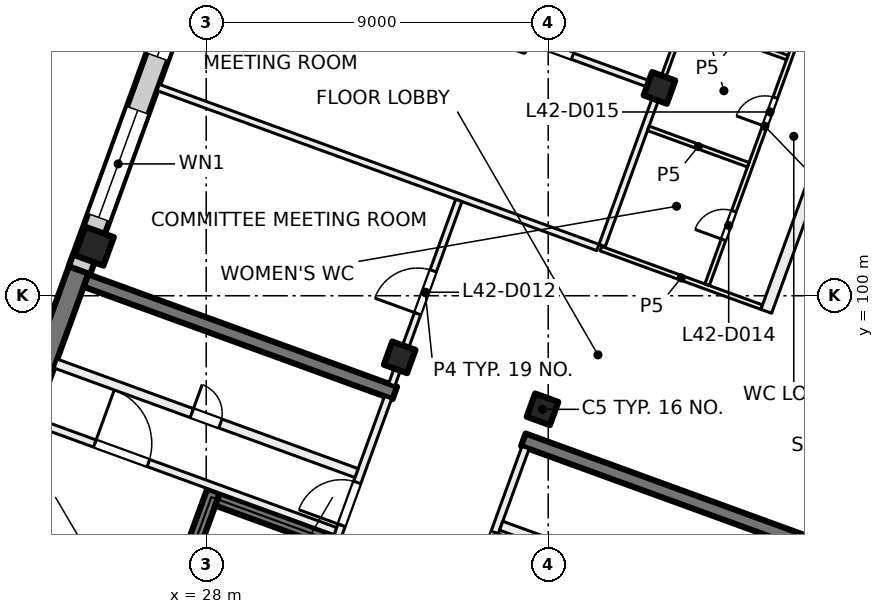
"""IFC4 building model, lengths in metres.
Left out: names, types, materials, properties, quantities, classifications, styles, units other than length and angle.
Written with IfcOpenShell. Run it as: python <this file> out.ifc"""

import sys

from ifc_helpers import new_model, si_unit, direction, frame, frame_2d, origin, origin_2d, place, context, subcontext, project, spatial, rectangle, extrude, element, fill, save


model = new_model("IFC4")
c1 = context("Model", 3, precision=1e-05, world=origin(), true_north=direction((0.0, 1.0)))
c2 = subcontext(c1, "Body", "Model", "MODEL_VIEW")
j1 = project(units=[si_unit("LENGTHUNIT", "METRE"), si_unit("PLANEANGLEUNIT", "RADIAN")], contexts=[c1])
p1 = place(None, origin())
s1 = spatial("IfcSite", under=j1, at=p1, CompositionType="ELEMENT")
p2 = place(p1, origin())
s2 = spatial("IfcBuilding", under=s1, at=p2, CompositionType="ELEMENT")
p3 = place(p2, frame((0.0, 0.0, 178.5)))
s3 = spatial("IfcBuildingStorey", under=s2, at=p3, CompositionType="ELEMENT", Elevation=178.5)
for number, where, z_axis, x_axis in (
    (1, (39.927, 105.468, 0.0), (0.0, 0.0, 1.0), (-0.342, -0.94, 0.0)),
    (2, (36.849, 97.011, 0.0), (0.0, 0.0, 1.0), (-0.342, -0.94, 0.0)),
    (3, (33.091, 98.379, 0.0), (0.0, 0.0, 1.0), (-0.342, -0.94, 0.0)),
):
    element("IfcColumn", number, at=place(p3, frame(where, z_axis=z_axis, x_axis=x_axis)), inside=s3, PredefinedType="COLUMN", context=c2, shape_type="SweptSolid", body=[
        extrude(rectangle(XDim=0.65, YDim=0.65, at=origin_2d()), origin(), (0.0, 0.0, 1.0), 4.0),
    ])
p4 = place(p3, frame((25.056, 101.303, 0.0), z_axis=(0.0, 0.0, 1.0), x_axis=(-0.342020143326, -0.939692620786, 0.0)))
e4 = element("IfcColumn", 4, at=p4, inside=s3, PredefinedType="COLUMN", context=c2, shape_type="SweptSolid", body=[
    extrude(rectangle(XDim=0.8, YDim=0.8, at=origin_2d()), origin(), (0.0, 0.0, 1.0), 4.0),
])
p5 = place(p3, frame((41.85, 85.241, 0.0), z_axis=(0.0, 0.0, 1.0), x_axis=(0.34201902012, 0.939693029598, 0.0)))
e5 = element("IfcWall", 5, at=p5, inside=s3, PredefinedType="SHEAR", context=c2, shape_type="SweptSolid", body=[
    extrude(rectangle(XDim=8.95, YDim=0.55, at=frame_2d((4.475, 0.0))), origin(), (0.0, 0.0, 1.0), 4.0),
])
p6 = place(p3, frame((21.694, 92.577, 0.0), z_axis=(0.0, 0.0, 1.0), x_axis=(0.342010253184, 0.939696220444, 0.0)))
e6 = element("IfcWall", 6, at=p6, inside=s3, PredefinedType="SHEAR", context=c2, shape_type="SweptSolid", body=[
    extrude(rectangle(XDim=8.95, YDim=0.55, at=frame_2d((4.475, 0.0))), origin(), (0.0, 0.0, 1.0), 4.0),
])
p7 = place(p3, frame((27.208, 82.216, 0.0), z_axis=(0.0, 0.0, 1.0), x_axis=(0.34201563943, 0.939694260058, 0.0)))
e7 = element("IfcWall", 7, at=p7, inside=s3, PredefinedType="SHEAR", context=c2, shape_type="SweptSolid", body=[
    extrude(rectangle(XDim=12.225, YDim=0.35, at=frame_2d((6.113, 0.0))), origin(), (0.0, 0.0, 1.0), 4.0),
])
p8 = place(p7, frame((0.7, 0.0, 0.0)))
e8 = element("IfcOpeningElement", 8, at=p8, cuts=e7, PredefinedType="OPENING", context=c2, shape_type="SweptSolid", body=[
    extrude(rectangle(XDim=1.1, YDim=2.1, at=frame_2d((0.55, 1.05))), frame((0.0, 0.185, 0.0), z_axis=(0.0, -1.0, 0.0), x_axis=(1.0, 0.0, 0.0)), (0.0, 0.0, 1.0), 0.37),
])
p9 = place(p7, frame((3.1, 0.0, 0.0)))
e9 = element("IfcOpeningElement", 9, at=p9, cuts=e7, PredefinedType="OPENING", context=c2, shape_type="SweptSolid", body=[
    extrude(rectangle(XDim=1.1, YDim=2.1, at=frame_2d((0.55, 1.05))), frame((0.0, 0.185, 0.0), z_axis=(0.0, -1.0, 0.0), x_axis=(1.0, 0.0, 0.0)), (0.0, 0.0, 1.0), 0.37),
])
p10 = place(p7, frame((5.5, 0.0, 0.0)))
e10 = element("IfcOpeningElement", 10, at=p10, cuts=e7, PredefinedType="OPENING", context=c2, shape_type="SweptSolid", body=[
    extrude(rectangle(XDim=1.1, YDim=2.1, at=frame_2d((0.55, 1.05))), frame((0.0, 0.185, 0.0), z_axis=(0.0, -1.0, 0.0), x_axis=(1.0, 0.0, 0.0)), (0.0, 0.0, 1.0), 0.37),
])
p11 = place(p7, frame((10.3, 0.0, 0.0)))
e11 = element("IfcOpeningElement", 11, at=p11, cuts=e7, PredefinedType="OPENING", context=c2, shape_type="SweptSolid", body=[
    extrude(rectangle(XDim=1.1, YDim=2.1, at=frame_2d((0.55, 1.05))), frame((0.0, 0.185, 0.0), z_axis=(0.0, -1.0, 0.0), x_axis=(1.0, 0.0, 0.0)), (0.0, 0.0, 1.0), 0.37),
])
p12 = place(p3, frame((24.013, 83.379, 0.0), z_axis=(0.0, 0.0, 1.0), x_axis=(0.34201563943, 0.939694260058, 0.0)))
e12 = element("IfcWall", 12, at=p12, inside=s3, PredefinedType="SHEAR", context=c2, shape_type="SweptSolid", body=[
    extrude(rectangle(XDim=12.225, YDim=0.35, at=frame_2d((6.113, 0.0))), origin(), (0.0, 0.0, 1.0), 4.0),
])
p13 = place(p12, frame((7.95, 0.0, 0.0)))
e13 = element("IfcOpeningElement", 13, at=p13, cuts=e12, PredefinedType="OPENING", context=c2, shape_type="SweptSolid", body=[
    extrude(rectangle(XDim=1.1, YDim=2.1, at=frame_2d((0.55, 1.05))), frame((0.0, 0.185, 0.0), z_axis=(0.0, -1.0, 0.0), x_axis=(1.0, 0.0, 0.0)), (0.0, 0.0, 1.0), 0.37),
])
p14 = place(p3, frame((31.165, 93.599, 0.0), z_axis=(0.0, 0.0, 1.0), x_axis=(-0.939683528043, 0.3420451244, 0.0)))
e14 = element("IfcWall", 14, at=p14, inside=s3, PredefinedType="SHEAR", context=c2, shape_type="SweptSolid", body=[
    extrude(rectangle(XDim=3.05, YDim=0.35, at=frame_2d((1.525, 0.0))), origin(), (0.0, 0.0, 1.0), 4.0),
])
p15 = place(p3, frame((44.473, 93.251, 0.0), z_axis=(0.0, 0.0, 1.0), x_axis=(-0.939692847377, 0.34201952077, 0.0)))
e15 = element("IfcWall", 15, at=p15, inside=s3, PredefinedType="SHEAR", context=c2, shape_type="SweptSolid", body=[
    extrude(rectangle(XDim=8.65, YDim=0.35, at=frame_2d((4.325, 0.0))), origin(), (0.0, 0.0, 1.0), 4.0),
])
p16 = place(p3, frame((32.962, 97.441, 0.0), z_axis=(0.0, 0.0, 1.0), x_axis=(-0.939689545667, 0.342028592028, 0.0)))
e16 = element("IfcWall", 16, at=p16, inside=s3, PredefinedType="SHEAR", context=c2, shape_type="SweptSolid", body=[
    extrude(rectangle(XDim=8.65, YDim=0.35, at=frame_2d((4.325, 0.0))), origin(), (0.0, 0.0, 1.0), 4.0),
])
p17 = place(p3, frame((24.666, 100.669, 0.0), z_axis=(0.0, 0.0, 1.0), x_axis=(0.34201964167, 0.939692803373, 0.0)))
e17 = element("IfcWall", 17, at=p17, inside=s3, PredefinedType="SOLIDWALL", context=c2, shape_type="SweptSolid", body=[
    extrude(rectangle(XDim=32.884, YDim=0.6, at=frame_2d((16.442, 0.0))), origin(), (0.0, 0.0, 1.0), 3.625),
])
p18 = place(p17, frame((1.48, 0.0, 0.9)))
e18 = element("IfcOpeningElement", 18, at=p18, cuts=e17, PredefinedType="OPENING", context=c2, shape_type="SweptSolid", body=[
    extrude(rectangle(XDim=3.0, YDim=2.4, at=frame_2d((1.5, 1.2))), frame((0.0, 0.31, 0.0), z_axis=(0.0, -1.0, 0.0), x_axis=(1.0, 0.0, 0.0)), (0.0, 0.0, 1.0), 0.62),
])
p19 = place(p17, frame((5.98, 0.0, 0.9)))
e19 = element("IfcOpeningElement", 19, at=p19, cuts=e17, PredefinedType="OPENING", context=c2, shape_type="SweptSolid", body=[
    extrude(rectangle(XDim=3.0, YDim=2.4, at=frame_2d((1.5, 1.2))), frame((0.0, 0.31, 0.0), z_axis=(0.0, -1.0, 0.0), x_axis=(1.0, 0.0, 0.0)), (0.0, 0.0, 1.0), 0.62),
])
p20 = place(p17, frame((11.08, 0.0, 0.0)))
e20 = element("IfcOpeningElement", 20, at=p20, cuts=e17, PredefinedType="OPENING", context=c2, shape_type="SweptSolid", body=[
    extrude(rectangle(XDim=1.8, YDim=2.4, at=frame_2d((0.9, 1.2))), frame((0.0, 0.31, 0.0), z_axis=(0.0, -1.0, 0.0), x_axis=(1.0, 0.0, 0.0)), (0.0, 0.0, 1.0), 0.62),
])
p21 = place(p17, frame((14.98, 0.0, 0.9)))
e21 = element("IfcOpeningElement", 21, at=p21, cuts=e17, PredefinedType="OPENING", context=c2, shape_type="SweptSolid", body=[
    extrude(rectangle(XDim=3.0, YDim=2.4, at=frame_2d((1.5, 1.2))), frame((0.0, 0.31, 0.0), z_axis=(0.0, -1.0, 0.0), x_axis=(1.0, 0.0, 0.0)), (0.0, 0.0, 1.0), 0.62),
])
p22 = place(p17, frame((19.48, 0.0, 0.9)))
e22 = element("IfcOpeningElement", 22, at=p22, cuts=e17, PredefinedType="OPENING", context=c2, shape_type="SweptSolid", body=[
    extrude(rectangle(XDim=3.0, YDim=2.4, at=frame_2d((1.5, 1.2))), frame((0.0, 0.31, 0.0), z_axis=(0.0, -1.0, 0.0), x_axis=(1.0, 0.0, 0.0)), (0.0, 0.0, 1.0), 0.62),
])
p23 = place(p17, frame((24.58, 0.0, 0.0)))
e23 = element("IfcOpeningElement", 23, at=p23, cuts=e17, PredefinedType="OPENING", context=c2, shape_type="SweptSolid", body=[
    extrude(rectangle(XDim=1.8, YDim=2.4, at=frame_2d((0.9, 1.2))), frame((0.0, 0.31, 0.0), z_axis=(0.0, -1.0, 0.0), x_axis=(1.0, 0.0, 0.0)), (0.0, 0.0, 1.0), 0.62),
])
p24 = place(p17, frame((28.48, 0.0, 0.9)))
e24 = element("IfcOpeningElement", 24, at=p24, cuts=e17, PredefinedType="OPENING", context=c2, shape_type="SweptSolid", body=[
    extrude(rectangle(XDim=3.0, YDim=2.4, at=frame_2d((1.5, 1.2))), frame((0.0, 0.31, 0.0), z_axis=(0.0, -1.0, 0.0), x_axis=(1.0, 0.0, 0.0)), (0.0, 0.0, 1.0), 0.62),
])
p25 = place(p3, frame((31.459, 93.678, 0.0), z_axis=(0.0, 0.0, 1.0), x_axis=(0.341985870128, 0.939705094502, 0.0)))
e25 = element("IfcWall", 25, at=p25, inside=s3, PredefinedType="PARTITIONING", context=c2, shape_type="SweptSolid", body=[
    extrude(rectangle(XDim=3.875, YDim=0.2, at=frame_2d((1.938, 0.0))), origin(), (0.0, 0.0, 1.0), 3.625),
])
p26 = place(p25, frame((0.3, 0.0, 0.0)))
e26 = element("IfcOpeningElement", 26, at=p26, cuts=e25, PredefinedType="OPENING", context=c2, shape_type="SweptSolid", body=[
    extrude(rectangle(XDim=1.2, YDim=2.1, at=frame_2d((0.6, 1.05))), frame((0.0, 0.11, 0.0), z_axis=(0.0, -1.0, 0.0), x_axis=(1.0, 0.0, 0.0)), (0.0, 0.0, 1.0), 0.22),
])
p27 = place(p3, frame((23.483, 96.688, 0.0), z_axis=(0.0, 0.0, 1.0), x_axis=(0.939691007314, -0.342024576271, 0.0)))
e27 = element("IfcWall", 27, at=p27, inside=s3, PredefinedType="PARTITIONING", context=c2, shape_type="SweptSolid", body=[
    extrude(rectangle(XDim=8.425, YDim=0.2, at=frame_2d((4.212, 0.0))), origin(), (0.0, 0.0, 1.0), 3.625),
])
p28 = place(p27, frame((1.688, 0.0, 0.0)))
e28 = element("IfcOpeningElement", 28, at=p28, cuts=e27, PredefinedType="OPENING", context=c2, shape_type="SweptSolid", body=[
    extrude(rectangle(XDim=1.5, YDim=2.1, at=frame_2d((0.75, 1.05))), frame((0.0, 0.11, 0.0), z_axis=(0.0, -1.0, 0.0), x_axis=(1.0, 0.0, 0.0)), (0.0, 0.0, 1.0), 0.22),
])
p29 = place(p3, frame((24.039, 98.215, 0.0), z_axis=(0.0, 0.0, 1.0), x_axis=(0.939687617333, -0.342033889887, 0.0)))
e29 = element("IfcWall", 29, at=p29, inside=s3, PredefinedType="PARTITIONING", context=c2, shape_type="SweptSolid", body=[
    extrude(rectangle(XDim=8.425, YDim=0.25, at=frame_2d((4.212, 0.0))), origin(), (0.0, 0.0, 1.0), 3.625),
])
p30 = place(p29, frame((3.812, 0.0, 0.0)))
e30 = element("IfcOpeningElement", 30, at=p30, cuts=e29, PredefinedType="OPENING", context=c2, shape_type="SweptSolid", body=[
    extrude(rectangle(XDim=0.8, YDim=2.1, at=frame_2d((0.4, 1.05))), frame((0.0, 0.135, 0.0), z_axis=(0.0, -1.0, 0.0), x_axis=(1.0, 0.0, 0.0)), (0.0, 0.0, 1.0), 0.27),
])
p31 = place(p3, frame((36.403, 96.003, 0.0), z_axis=(0.0, 0.0, 1.0), x_axis=(-0.342041503764, -0.939684845947, 0.0)))
e31 = element("IfcWall", 31, at=p31, inside=s3, PredefinedType="PARTITIONING", context=c2, shape_type="SweptSolid", body=[
    extrude(rectangle(XDim=3.875, YDim=0.2, at=frame_2d((1.938, 0.0))), origin(), (0.0, 0.0, 1.0), 3.625),
])
p32 = place(p31, frame((2.375, 0.0, 0.0)))
e32 = element("IfcOpeningElement", 32, at=p32, cuts=e31, PredefinedType="OPENING", context=c2, shape_type="SweptSolid", body=[
    extrude(rectangle(XDim=1.2, YDim=2.1, at=frame_2d((0.6, 1.05))), frame((0.0, 0.11, 0.0), z_axis=(0.0, -1.0, 0.0), x_axis=(1.0, 0.0, 0.0)), (0.0, 0.0, 1.0), 0.22),
])
p33 = place(p3, frame((35.761, 93.948, 0.0), z_axis=(0.0, 0.0, 1.0), x_axis=(0.93969693093, -0.342008301071, 0.0)))
e33 = element("IfcWall", 33, at=p33, inside=s3, PredefinedType="PARTITIONING", context=c2, shape_type="SweptSolid", body=[
    extrude(rectangle(XDim=8.425, YDim=0.25, at=frame_2d((4.212, 0.0))), origin(), (0.0, 0.0, 1.0), 3.625),
])
p34 = place(p33, frame((3.812, 0.0, 0.0)))
e34 = element("IfcOpeningElement", 34, at=p34, cuts=e33, PredefinedType="OPENING", context=c2, shape_type="SweptSolid", body=[
    extrude(rectangle(XDim=0.8, YDim=2.1, at=frame_2d((0.4, 1.05))), frame((0.0, 0.135, 0.0), z_axis=(0.0, -1.0, 0.0), x_axis=(1.0, 0.0, 0.0)), (0.0, 0.0, 1.0), 0.27),
])
p35 = place(p3, frame((26.736, 105.48, 0.0), z_axis=(0.0, 0.0, 1.0), x_axis=(0.939721611154, -0.341940482438, 0.0)))
e35 = element("IfcWall", 35, at=p35, inside=s3, PredefinedType="PARTITIONING", context=c2, shape_type="SweptSolid", body=[
    extrude(rectangle(XDim=12.312, YDim=0.175, at=frame_2d((6.156, 0.0))), origin(), (0.0, 0.0, 1.0), 3.625),
])
p36 = place(p3, frame((32.881, 97.657, 0.0), z_axis=(0.0, 0.0, 1.0), x_axis=(0.342058204353, 0.939678766832, 0.0)))
e36 = element("IfcWall", 36, at=p36, inside=s3, PredefinedType="PARTITIONING", context=c2, shape_type="SweptSolid", body=[
    extrude(rectangle(XDim=5.163, YDim=0.175, at=frame_2d((2.581, 0.0))), origin(), (0.0, 0.0, 1.0), 3.625),
])
p37 = place(p36, frame((1.991, 0.0, 0.0)))
e37 = element("IfcOpeningElement", 37, at=p37, cuts=e36, PredefinedType="OPENING", context=c2, shape_type="SweptSolid", body=[
    extrude(rectangle(XDim=1.2, YDim=2.1, at=frame_2d((0.6, 1.05))), frame((0.0, 0.097, 0.0), z_axis=(0.0, -1.0, 0.0), x_axis=(1.0, 0.0, 0.0)), (0.0, 0.0, 1.0), 0.195),
])
p38 = place(p3, frame((38.385, 101.24, 0.0), z_axis=(0.0, 0.0, 1.0), x_axis=(0.939711088937, -0.341969398235, 0.0)))
e38 = element("IfcWall", 38, at=p38, inside=s3, PredefinedType="PARTITIONING", context=c2, shape_type="SweptSolid", body=[
    extrude(rectangle(XDim=4.503, YDim=0.125, at=frame_2d((2.252, 0.0))), origin(), (0.0, 0.0, 1.0), 3.625),
])
p39 = place(p3, frame((38.418, 101.322, 0.0), z_axis=(0.0, 0.0, 1.0), x_axis=(0.341987815327, 0.939704386585, 0.0)))
e39 = element("IfcWall", 39, at=p39, inside=s3, PredefinedType="PARTITIONING", context=c2, shape_type="SweptSolid", body=[
    extrude(rectangle(XDim=4.325, YDim=0.175, at=frame_2d((2.162, 0.0))), origin(), (0.0, 0.0, 1.0), 3.625),
])
p40 = place(p3, frame((39.926, 105.465, 0.0), z_axis=(0.0, 0.0, 1.0), x_axis=(0.342263852659, 0.93960388205, 0.0)))
e40 = element("IfcWall", 40, at=p40, inside=s3, PredefinedType="PARTITIONING", context=c2, shape_type="SweptSolid", body=[
    extrude(rectangle(XDim=4.441, YDim=0.125, at=frame_2d((2.221, 0.0))), origin(), (0.0, 0.0, 1.0), 3.625),
])
p41 = place(p3, frame((28.275, 109.709, 0.0), z_axis=(0.0, 0.0, 1.0), x_axis=(0.939698441386, -0.342004150936, 0.0)))
e41 = element("IfcWall", 41, at=p41, inside=s3, PredefinedType="PARTITIONING", context=c2, shape_type="SweptSolid", body=[
    extrude(rectangle(XDim=12.312, YDim=0.175, at=frame_2d((6.156, 0.0))), origin(), (0.0, 0.0, 1.0), 3.625),
])
p42 = place(p41, frame((8.765, 0.0, 0.0)))
e42 = element("IfcOpeningElement", 42, at=p42, cuts=e41, PredefinedType="OPENING", context=c2, shape_type="SweptSolid", body=[
    extrude(rectangle(XDim=1.2, YDim=2.1, at=frame_2d((0.6, 1.05))), frame((0.0, 0.097, 0.0), z_axis=(0.0, -1.0, 0.0), x_axis=(1.0, 0.0, 0.0)), (0.0, 0.0, 1.0), 0.195),
])
p43 = place(p3, frame((41.181, 100.29, 0.0), z_axis=(0.0, 0.0, 1.0), x_axis=(0.34222012082, 0.939619810831, 0.0)))
e43 = element("IfcWall", 43, at=p43, inside=s3, PredefinedType="PARTITIONING", context=c2, shape_type="SweptSolid", body=[
    extrude(rectangle(XDim=8.875, YDim=0.125, at=frame_2d((4.438, 0.0))), origin(), (0.0, 0.0, 1.0), 3.625),
])
p44 = place(p43, frame((1.258, 0.0, 0.0)))
e44 = element("IfcOpeningElement", 44, at=p44, cuts=e43, PredefinedType="OPENING", context=c2, shape_type="SweptSolid", body=[
    extrude(rectangle(XDim=0.8, YDim=2.1, at=frame_2d((0.4, 1.05))), frame((0.0, 0.073, 0.0), z_axis=(0.0, -1.0, 0.0), x_axis=(1.0, 0.0, 0.0)), (0.0, 0.0, 1.0), 0.145),
])
p45 = place(p43, frame((4.437, 0.0, 0.0)))
e45 = element("IfcOpeningElement", 45, at=p45, cuts=e43, PredefinedType="OPENING", context=c2, shape_type="SweptSolid", body=[
    extrude(rectangle(XDim=0.8, YDim=2.1, at=frame_2d((0.4, 1.05))), frame((0.0, 0.073, 0.0), z_axis=(0.0, -1.0, 0.0), x_axis=(1.0, 0.0, 0.0)), (0.0, 0.0, 1.0), 0.145),
])
p46 = place(p43, frame((7.116, 0.0, 0.0)))
e46 = element("IfcOpeningElement", 46, at=p46, cuts=e43, PredefinedType="OPENING", context=c2, shape_type="SweptSolid", body=[
    extrude(rectangle(XDim=1.0, YDim=2.1, at=frame_2d((0.5, 1.05))), frame((0.0, 0.073, 0.0), z_axis=(0.0, -1.0, 0.0), x_axis=(1.0, 0.0, 0.0)), (0.0, 0.0, 1.0), 0.145),
])
p47 = place(p3, frame((42.264, 103.446, 0.0), z_axis=(0.0, 0.0, 1.0), x_axis=(-0.939640574808, 0.342163104635, 0.0)))
e47 = element("IfcWall", 47, at=p47, inside=s3, PredefinedType="PARTITIONING", context=c2, shape_type="SweptSolid", body=[
    extrude(rectangle(XDim=2.8, YDim=0.125, at=frame_2d((1.4, 0.0))), origin(), (0.0, 0.0, 1.0), 3.625),
])
p48 = place(p3, frame((47.325, 112.197, 0.0), z_axis=(0.0, 0.0, 1.0), x_axis=(-0.341976837053, -0.93970838185, 0.0)))
e48 = element("IfcWall", 48, at=p48, inside=s3, PredefinedType="PARTITIONING", context=c2, shape_type="SweptSolid", body=[
    extrude(rectangle(XDim=13.416, YDim=0.3, at=frame_2d((6.708, 0.0))), origin(), (0.0, 0.0, 1.0), 3.625),
])
p49 = place(p48, frame((8.354, 0.0, 0.0)))
e49 = element("IfcOpeningElement", 49, at=p49, cuts=e48, PredefinedType="OPENING", context=c2, shape_type="SweptSolid", body=[
    extrude(rectangle(XDim=1.0, YDim=2.1, at=frame_2d((0.5, 1.05))), frame((0.0, 0.16, 0.0), z_axis=(0.0, -1.0, 0.0), x_axis=(1.0, 0.0, 0.0)), (0.0, 0.0, 1.0), 0.32),
])
p50 = place(p48, frame((1.267, 0.0, 0.0)))
e50 = element("IfcOpeningElement", 50, at=p50, cuts=e48, PredefinedType="OPENING", context=c2, shape_type="SweptSolid", body=[
    extrude(rectangle(XDim=1.8, YDim=2.1, at=frame_2d((0.9, 1.05))), frame((0.0, 0.16, 0.0), z_axis=(0.0, -1.0, 0.0), x_axis=(1.0, 0.0, 0.0)), (0.0, 0.0, 1.0), 0.32),
])
p51 = place(p3, frame((43.29, 106.266, 0.0), z_axis=(0.0, 0.0, 1.0), x_axis=(-0.939601484935, 0.342270433294, 0.0)))
e51 = element("IfcWall", 51, at=p51, inside=s3, PredefinedType="PARTITIONING", context=c2, shape_type="SweptSolid", body=[
    extrude(rectangle(XDim=2.825, YDim=0.125, at=frame_2d((1.412, 0.0))), origin(), (0.0, 0.0, 1.0), 3.625),
])
p52 = place(p18, origin())
e52 = element("IfcWindow", 52, at=p52, inside=s3, PartitioningType="SINGLE_PANEL", PredefinedType="WINDOW", context=c2, shape_type="SweptSolid", body=[
    extrude(rectangle(XDim=3.0, YDim=2.4, at=frame_2d((1.5, 1.2))), frame((0.0, 0.03, 0.0), z_axis=(0.0, -1.0, 0.0), x_axis=(1.0, 0.0, 0.0)), (0.0, 0.0, 1.0), 0.06),
])
fill(e18, e52)
p53 = place(p19, origin())
e53 = element("IfcWindow", 53, at=p53, inside=s3, PartitioningType="SINGLE_PANEL", PredefinedType="WINDOW", context=c2, shape_type="SweptSolid", body=[
    extrude(rectangle(XDim=3.0, YDim=2.4, at=frame_2d((1.5, 1.2))), frame((0.0, 0.03, 0.0), z_axis=(0.0, -1.0, 0.0), x_axis=(1.0, 0.0, 0.0)), (0.0, 0.0, 1.0), 0.06),
])
fill(e19, e53)
p54 = place(p26, origin())
e54 = element("IfcDoor", 54, at=p54, inside=s3, OperationType="DOUBLE_DOOR_SINGLE_SWING", PredefinedType="DOOR", context=c2, shape_type="SweptSolid", body=[
    extrude(rectangle(XDim=1.2, YDim=2.1, at=frame_2d((0.6, 1.05))), frame((0.0, 0.025, 0.0), z_axis=(0.0, -1.0, 0.0), x_axis=(1.0, 0.0, 0.0)), (0.0, 0.0, 1.0), 0.05),
])
fill(e26, e54)
p55 = place(p28, origin())
e55 = element("IfcDoor", 55, at=p55, inside=s3, OperationType="DOUBLE_DOOR_SINGLE_SWING", PredefinedType="DOOR", context=c2, shape_type="SweptSolid", body=[
    extrude(rectangle(XDim=1.5, YDim=2.1, at=frame_2d((0.75, 1.05))), frame((0.0, 0.025, 0.0), z_axis=(0.0, -1.0, 0.0), x_axis=(1.0, 0.0, 0.0)), (0.0, 0.0, 1.0), 0.05),
])
fill(e28, e55)
p56 = place(p30, origin())
e56 = element("IfcDoor", 56, at=p56, inside=s3, OperationType="SINGLE_SWING_LEFT", PredefinedType="DOOR", context=c2, shape_type="SweptSolid", body=[
    extrude(rectangle(XDim=0.8, YDim=2.1, at=frame_2d((0.4, 1.05))), frame((0.0, 0.025, 0.0), z_axis=(0.0, -1.0, 0.0), x_axis=(1.0, 0.0, 0.0)), (0.0, 0.0, 1.0), 0.05),
])
fill(e30, e56)
p57 = place(p32, origin())
e57 = element("IfcDoor", 57, at=p57, inside=s3, OperationType="DOUBLE_DOOR_SINGLE_SWING", PredefinedType="DOOR", context=c2, shape_type="SweptSolid", body=[
    extrude(rectangle(XDim=1.2, YDim=2.1, at=frame_2d((0.6, 1.05))), frame((0.0, 0.025, 0.0), z_axis=(0.0, -1.0, 0.0), x_axis=(1.0, 0.0, 0.0)), (0.0, 0.0, 1.0), 0.05),
])
fill(e32, e57)
p58 = place(p37, origin())
e58 = element("IfcDoor", 58, at=p58, inside=s3, OperationType="DOUBLE_DOOR_SINGLE_SWING", PredefinedType="DOOR", context=c2, shape_type="SweptSolid", body=[
    extrude(rectangle(XDim=1.2, YDim=2.1, at=frame_2d((0.6, 1.05))), frame((0.0, 0.025, 0.0), z_axis=(0.0, -1.0, 0.0), x_axis=(1.0, 0.0, 0.0)), (0.0, 0.0, 1.0), 0.05),
])
fill(e37, e58)
p59 = place(p44, origin())
e59 = element("IfcDoor", 59, at=p59, inside=s3, OperationType="SINGLE_SWING_LEFT", PredefinedType="DOOR", context=c2, shape_type="SweptSolid", body=[
    extrude(rectangle(XDim=0.8, YDim=2.1, at=frame_2d((0.4, 1.05))), frame((0.0, 0.025, 0.0), z_axis=(0.0, -1.0, 0.0), x_axis=(1.0, 0.0, 0.0)), (0.0, 0.0, 1.0), 0.05),
])
fill(e44, e59)
p60 = place(p45, origin())
e60 = element("IfcDoor", 60, at=p60, inside=s3, OperationType="SINGLE_SWING_LEFT", PredefinedType="DOOR", context=c2, shape_type="SweptSolid", body=[
    extrude(rectangle(XDim=0.8, YDim=2.1, at=frame_2d((0.4, 1.05))), frame((0.0, 0.025, 0.0), z_axis=(0.0, -1.0, 0.0), x_axis=(1.0, 0.0, 0.0)), (0.0, 0.0, 1.0), 0.05),
])
fill(e45, e60)
p61 = place(p42, origin())
e61 = element("IfcDoor", 61, at=p61, inside=s3, OperationType="DOUBLE_DOOR_SINGLE_SWING", PredefinedType="DOOR", context=c2, shape_type="SweptSolid", body=[
    extrude(rectangle(XDim=1.2, YDim=2.1, at=frame_2d((0.6, 1.05))), frame((0.0, 0.025, 0.0), z_axis=(0.0, -1.0, 0.0), x_axis=(1.0, 0.0, 0.0)), (0.0, 0.0, 1.0), 0.05),
])
fill(e42, e61)
save(model, sys.argv[1])
